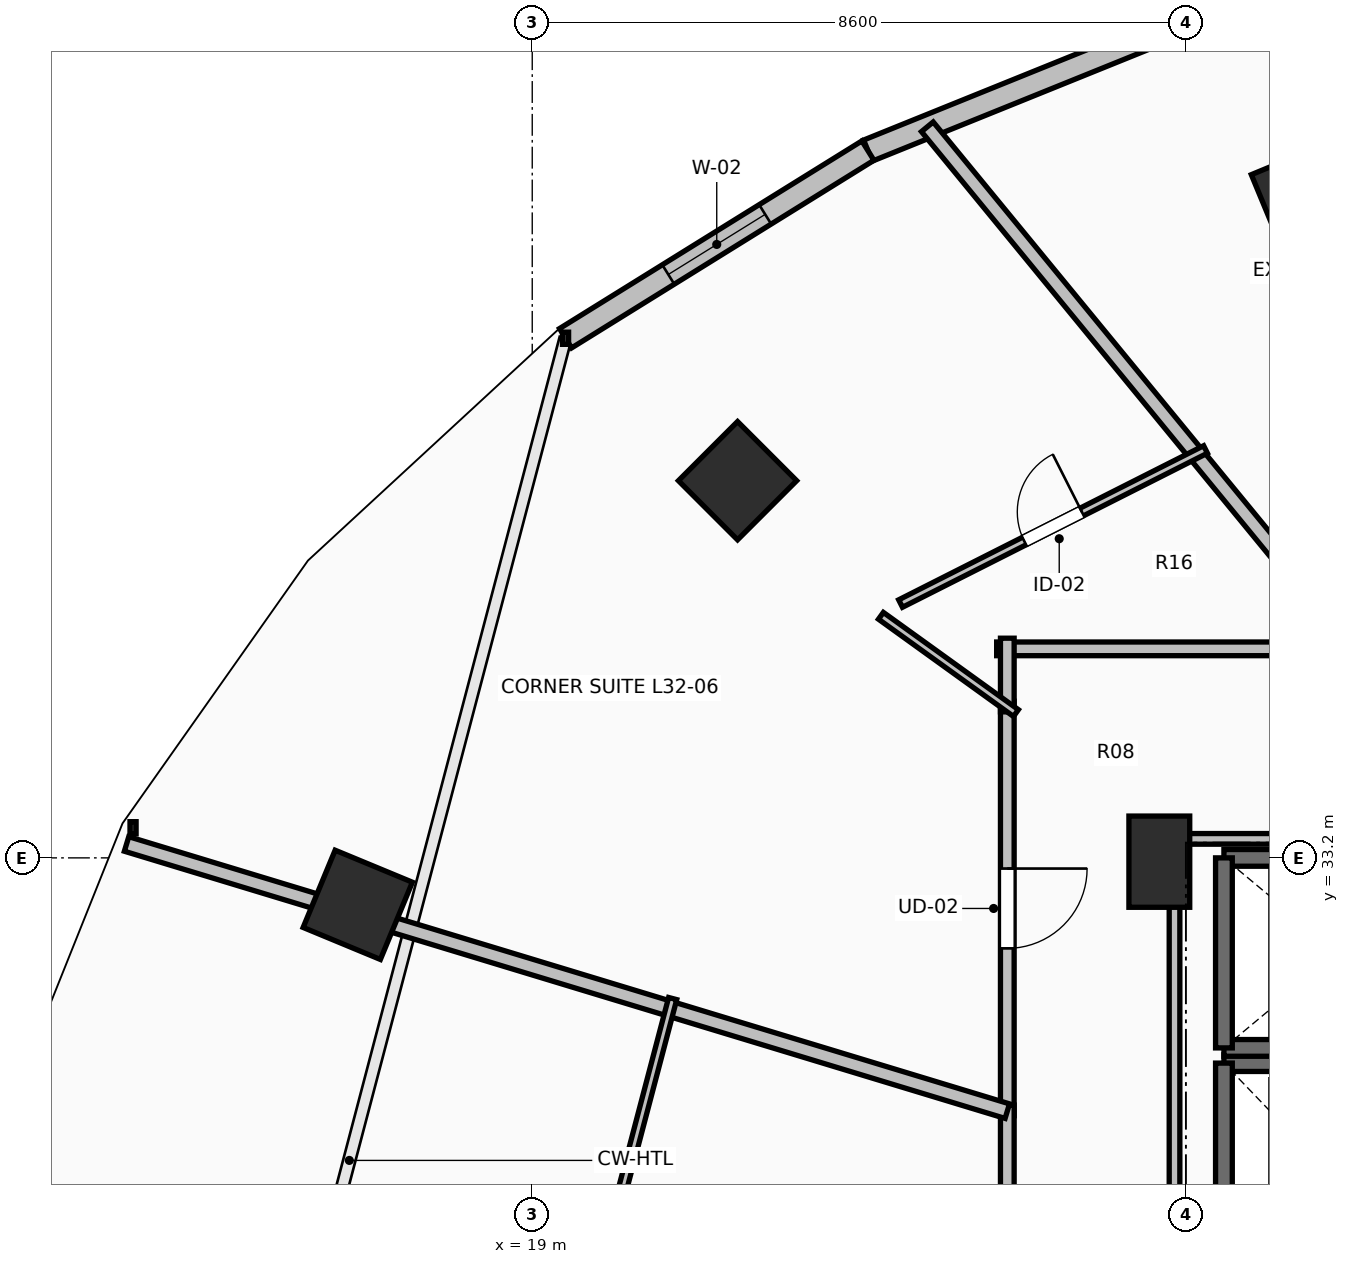
"""IFC4 building model, lengths in metres.
Left out: names, types, materials, properties, quantities, classifications, styles, units other than length and angle.
Written with IfcOpenShell. Run it as: python <this file> out.ifc"""

import sys

from ifc_helpers import new_model, si_unit, direction, frame, frame_2d, origin, origin_2d, place, context, subcontext, project, spatial, rectangle, extrude, element, fill, save


model = new_model("IFC4")
c1 = context("Model", 3, precision=1e-05, world=origin(), true_north=direction((0.0, 1.0)))
c2 = subcontext(c1, "Body", "Model", "MODEL_VIEW")
j1 = project(units=[si_unit("LENGTHUNIT", "METRE"), si_unit("PLANEANGLEUNIT", "RADIAN")], contexts=[c1])
p1 = place(None, origin())
s1 = spatial("IfcSite", under=j1, at=p1, CompositionType="ELEMENT")
p2 = place(p1, origin())
s2 = spatial("IfcBuilding", under=s1, at=p2, CompositionType="ELEMENT")
p3 = place(p2, frame((0.0, 0.0, 120.8)))
s3 = spatial("IfcBuildingStorey", under=s2, at=p3, CompositionType="ELEMENT", Elevation=120.8)
for number, where, z_axis, x_axis in (
    (1, (29.179, 41.891, 0.0), (0.0, 0.0, 1.0), (-0.383, 0.924, 0.0)),
    (2, (21.701, 38.162, 0.0), (0.0, 0.0, 1.0), (-0.707, 0.707, 0.0)),
    (3, (16.705, 32.582, 0.0), (0.0, 0.0, 1.0), (-0.924, 0.383, 0.0)),
):
    element("IfcColumn", number, at=place(p3, frame(where, z_axis=z_axis, x_axis=x_axis)), inside=s3, PredefinedType="COLUMN", context=c2, shape_type="SweptSolid", body=[
        extrude(rectangle(XDim=1.1, YDim=1.1, at=origin_2d()), origin(), (0.0, 0.0, 1.0), 3.5),
    ])
p4 = place(p3, frame((27.25, 33.15, 0.0), z_axis=(0.0, 0.0, 1.0), x_axis=(1.0, 0.0, 0.0)))
e4 = element("IfcColumn", 4, at=p4, inside=s3, PredefinedType="PILASTER", context=c2, shape_type="SweptSolid", body=[
    extrude(rectangle(XDim=0.8, YDim=1.2, at=origin_2d()), origin(), (0.0, 0.0, 1.0), 3.5),
])
p5 = place(p3, frame((27.955, 44.339, 0.0), z_axis=(0.0, 0.0, 1.0), x_axis=(-0.927122233109, -0.374759075775, 0.0)))
e5 = element("IfcWall", 5, at=p5, inside=s3, PredefinedType="STANDARD", context=c2, shape_type="SweptSolid", body=[
    extrude(rectangle(XDim=4.895, YDim=0.3, at=frame_2d((2.448, 0.0))), origin(), (0.0, 0.0, 1.0), 3.15),
])
p6 = place(p3, frame((23.416, 42.505, 0.0), z_axis=(0.0, 0.0, 1.0), x_axis=(-0.849684479743, -0.527291461038, 0.0)))
e6 = element("IfcWall", 6, at=p6, inside=s3, PredefinedType="STANDARD", context=c2, shape_type="SweptSolid", body=[
    extrude(rectangle(XDim=4.681, YDim=0.3, at=frame_2d((2.341, 0.0))), origin(), (0.0, 0.0, 1.0), 3.15),
])
p7 = place(p6, frame((1.591, 0.0, 0.85)))
e7 = element("IfcOpeningElement", 7, at=p7, cuts=e6, PredefinedType="OPENING", context=c2, shape_type="SweptSolid", body=[
    extrude(rectangle(XDim=1.5, YDim=2.1, at=frame_2d((0.75, 1.05))), frame((0.0, 0.165, 0.0), z_axis=(0.0, -1.0, 0.0), x_axis=(1.0, 0.0, 0.0)), (0.0, 0.0, 1.0), 0.33),
])
p8 = place(p3, frame((30.5, 30.5, 0.0), z_axis=(0.0, 0.0, 1.0), x_axis=(-1.0, 0.0, 0.0)))
e8 = element("IfcWall", 8, at=p8, inside=s3, PredefinedType="SHEAR", context=c2, shape_type="SweptSolid", body=[
    extrude(rectangle(XDim=2.4, YDim=0.22, at=frame_2d((1.2, 0.0))), origin(), (0.0, 0.0, 1.0), 3.15),
])
p9 = place(p3, frame((28.1, 30.5, 0.0), z_axis=(0.0, 0.0, 1.0), x_axis=(0.0, -1.0, 0.0)))
e9 = element("IfcWall", 9, at=p9, inside=s3, PredefinedType="SHEAR", context=c2, shape_type="SweptSolid", body=[
    extrude(rectangle(XDim=2.5, YDim=0.22, at=frame_2d((1.25, 0.0))), origin(), (0.0, 0.0, 1.0), 3.15),
])
p10 = place(p3, frame((28.1, 30.7, 0.0), z_axis=(0.0, 0.0, 1.0), x_axis=(1.0, 0.0, 0.0)))
e10 = element("IfcWall", 10, at=p10, inside=s3, PredefinedType="SOLIDWALL", context=c2, shape_type="SweptSolid", body=[
    extrude(rectangle(XDim=3.0, YDim=0.22, at=frame_2d((1.5, 0.0))), origin(), (0.0, 0.0, 1.0), 3.15),
])
p11 = place(p3, frame((31.1, 33.2, 0.0), z_axis=(0.0, 0.0, 1.0), x_axis=(-1.0, 0.0, 0.0)))
e11 = element("IfcWall", 11, at=p11, inside=s3, PredefinedType="SOLIDWALL", context=c2, shape_type="SweptSolid", body=[
    extrude(rectangle(XDim=3.0, YDim=0.22, at=frame_2d((1.5, 0.0))), origin(), (0.0, 0.0, 1.0), 3.15),
])
p12 = place(p11, frame((0.9, 0.0, 0.0)))
e12 = element("IfcOpeningElement", 12, at=p12, cuts=e11, PredefinedType="OPENING", context=c2, shape_type="SweptSolid", body=[
    extrude(rectangle(XDim=1.2, YDim=2.2, at=frame_2d((0.6, 1.1))), frame((0.0, 0.125, 0.0), z_axis=(0.0, -1.0, 0.0), x_axis=(1.0, 0.0, 0.0)), (0.0, 0.0, 1.0), 0.25),
])
p13 = place(p3, frame((28.1, 33.2, 0.0), z_axis=(0.0, 0.0, 1.0), x_axis=(0.0, -1.0, 0.0)))
e13 = element("IfcWall", 13, at=p13, inside=s3, PredefinedType="SOLIDWALL", context=c2, shape_type="SweptSolid", body=[
    extrude(rectangle(XDim=2.5, YDim=0.22, at=frame_2d((1.25, 0.0))), origin(), (0.0, 0.0, 1.0), 3.15),
])
p14 = place(p3, frame((25.25, 35.261, 0.0), z_axis=(0.0, 0.0, 1.0), x_axis=(0.0, -1.0, 0.0)))
e14 = element("IfcWall", 14, at=p14, inside=s3, PredefinedType="PARTITIONING", context=c2, shape_type="SweptSolid", body=[
    extrude(rectangle(XDim=5.453, YDim=0.18, at=frame_2d((2.727, 0.0))), origin(), (0.0, 0.0, 1.0), 2.342),
])
p15 = place(p14, frame((2.201, 0.0, 0.0)))
e15 = element("IfcOpeningElement", 15, at=p15, cuts=e14, PredefinedType="OPENING", context=c2, shape_type="SweptSolid", body=[
    extrude(rectangle(XDim=1.05, YDim=2.2, at=frame_2d((0.525, 1.1))), frame((0.0, 0.105, 0.0), z_axis=(0.0, -1.0, 0.0), x_axis=(1.0, 0.0, 0.0)), (0.0, 0.0, 1.0), 0.21),
])
p16 = place(p3, frame((29.896, 35.95, 0.0), z_axis=(0.0, 0.0, 1.0), x_axis=(-1.0, 0.0, 0.0)))
e16 = element("IfcWall", 16, at=p16, inside=s3, PredefinedType="PARTITIONING", context=c2, shape_type="SweptSolid", body=[
    extrude(rectangle(XDim=4.786, YDim=0.18, at=frame_2d((2.393, 0.0))), origin(), (0.0, 0.0, 1.0), 2.342),
])
p17 = place(p3, frame((25.25, 36.09, 0.0), z_axis=(0.0, 0.0, 1.0), x_axis=(0.0, -1.0, 0.0)))
e17 = element("IfcWall", 17, at=p17, inside=s3, PredefinedType="PARTITIONING", context=c2, shape_type="SweptSolid", body=[
    extrude(rectangle(XDim=0.969, YDim=0.18, at=frame_2d((0.484, 0.0))), origin(), (0.0, 0.0, 1.0), 2.342),
])
p18 = place(p3, frame((25.25, 29.948, 0.0), z_axis=(0.0, 0.0, 1.0), x_axis=(0.0, -1.0, 0.0)))
e18 = element("IfcWall", 18, at=p18, inside=s3, PredefinedType="PARTITIONING", context=c2, shape_type="SweptSolid", body=[
    extrude(rectangle(XDim=3.577, YDim=0.18, at=frame_2d((1.789, 0.0))), origin(), (0.0, 0.0, 1.0), 2.342),
])
p19 = place(p3, frame((24.198, 42.818, 0.0), z_axis=(0.0, 0.0, 1.0), x_axis=(0.634354930471, -0.773041927833, 0.0)))
e19 = element("IfcWall", 19, at=p19, inside=s3, PredefinedType="PARTITIONING", context=c2, shape_type="SweptSolid", body=[
    extrude(rectangle(XDim=8.885, YDim=0.2, at=frame_2d((4.442, 0.0))), origin(), (0.0, 0.0, 1.0), 2.342),
])
p20 = place(p3, frame((23.846, 36.546, 0.0), z_axis=(0.0, 0.0, 1.0), x_axis=(0.892540033684, 0.450968167692, 0.0)))
e20 = element("IfcWall", 20, at=p20, inside=s3, PredefinedType="PARTITIONING", context=c2, shape_type="SweptSolid", body=[
    extrude(rectangle(XDim=4.495, YDim=0.11, at=frame_2d((2.248, 0.0))), origin(), (0.0, 0.0, 1.0), 2.342),
])
p21 = place(p20, frame((1.823, 0.0, 0.0)))
e21 = element("IfcOpeningElement", 21, at=p21, cuts=e20, PredefinedType="OPENING", context=c2, shape_type="SweptSolid", body=[
    extrude(rectangle(XDim=0.85, YDim=2.1, at=frame_2d((0.425, 1.05))), frame((0.0, 0.07, 0.0), z_axis=(0.0, -1.0, 0.0), x_axis=(1.0, 0.0, 0.0)), (0.0, 0.0, 1.0), 0.14),
])
p22 = place(p3, frame((25.364, 35.105, 0.0), z_axis=(0.0, 0.0, 1.0), x_axis=(-0.811375655524, 0.584525059876, 0.0)))
e22 = element("IfcWall", 22, at=p22, inside=s3, PredefinedType="PARTITIONING", context=c2, shape_type="SweptSolid", body=[
    extrude(rectangle(XDim=2.189, YDim=0.11, at=frame_2d((1.094, 0.0))), origin(), (0.0, 0.0, 1.0), 2.342),
])
p23 = place(p3, frame((13.663, 33.383, 0.0), z_axis=(0.0, 0.0, 1.0), x_axis=(0.956933802543, -0.290306213422, 0.0)))
e23 = element("IfcWall", 23, at=p23, inside=s3, PredefinedType="PARTITIONING", context=c2, shape_type="SweptSolid", body=[
    extrude(rectangle(XDim=12.108, YDim=0.2, at=frame_2d((6.054, 0.0))), origin(), (0.0, 0.0, 1.0), 2.342),
])
p24 = place(p3, frame((19.575, 26.515, 0.0), z_axis=(0.0, 0.0, 1.0), x_axis=(0.254478876497, 0.967078332617, 0.0)))
e24 = element("IfcWall", 24, at=p24, inside=s3, PredefinedType="PARTITIONING", context=c2, shape_type="SweptSolid", body=[
    extrude(rectangle(XDim=4.999, YDim=0.11, at=frame_2d((2.5, 0.0))), origin(), (0.0, 0.0, 1.0), 2.342),
])
p25 = place(p3, frame((27.45, 28.196, 0.0), z_axis=(0.0, 0.0, 1.0), x_axis=(0.0, 1.0, 0.0)))
e25 = element("IfcWall", 25, at=p25, inside=s3, PredefinedType="PARTITIONING", context=c2, shape_type="SweptSolid", body=[
    extrude(rectangle(XDim=5.254, YDim=0.14, at=frame_2d((2.627, 0.0))), origin(), (0.0, 0.0, 1.0), 2.342),
])
p26 = place(p3, frame((27.45, 33.45, 0.0), z_axis=(0.0, 0.0, 1.0), x_axis=(1.0, 0.0, 0.0)))
e26 = element("IfcWall", 26, at=p26, inside=s3, PredefinedType="PARTITIONING", context=c2, shape_type="SweptSolid", body=[
    extrude(rectangle(XDim=1.444, YDim=0.14, at=frame_2d((0.722, 0.0))), origin(), (0.0, 0.0, 1.0), 2.342),
])
p27 = place(p7, origin())
e27 = element("IfcWindow", 27, at=p27, inside=s3, PartitioningType="SINGLE_PANEL", PredefinedType="WINDOW", context=c2, shape_type="SweptSolid", body=[
    extrude(rectangle(XDim=1.5, YDim=2.1, at=frame_2d((0.75, 1.05))), frame((0.0, 0.03, 0.0), z_axis=(0.0, -1.0, 0.0), x_axis=(1.0, 0.0, 0.0)), (0.0, 0.0, 1.0), 0.06),
])
fill(e7, e27)
p28 = place(p15, origin())
e28 = element("IfcDoor", 28, at=p28, inside=s3, OperationType="SINGLE_SWING_LEFT", PredefinedType="DOOR", context=c2, shape_type="SweptSolid", body=[
    extrude(rectangle(XDim=1.05, YDim=2.2, at=frame_2d((0.525, 1.1))), frame((0.0, 0.025, 0.0), z_axis=(0.0, -1.0, 0.0), x_axis=(1.0, 0.0, 0.0)), (0.0, 0.0, 1.0), 0.05),
])
fill(e15, e28)
p29 = place(p21, origin())
e29 = element("IfcDoor", 29, at=p29, inside=s3, OperationType="SINGLE_SWING_RIGHT", PredefinedType="DOOR", context=c2, shape_type="SweptSolid", body=[
    extrude(rectangle(XDim=0.85, YDim=2.1, at=frame_2d((0.425, 1.05))), frame((0.0, 0.025, 0.0), z_axis=(0.0, -1.0, 0.0), x_axis=(1.0, 0.0, 0.0)), (0.0, 0.0, 1.0), 0.05),
])
fill(e21, e29)
save(model, sys.argv[1])
